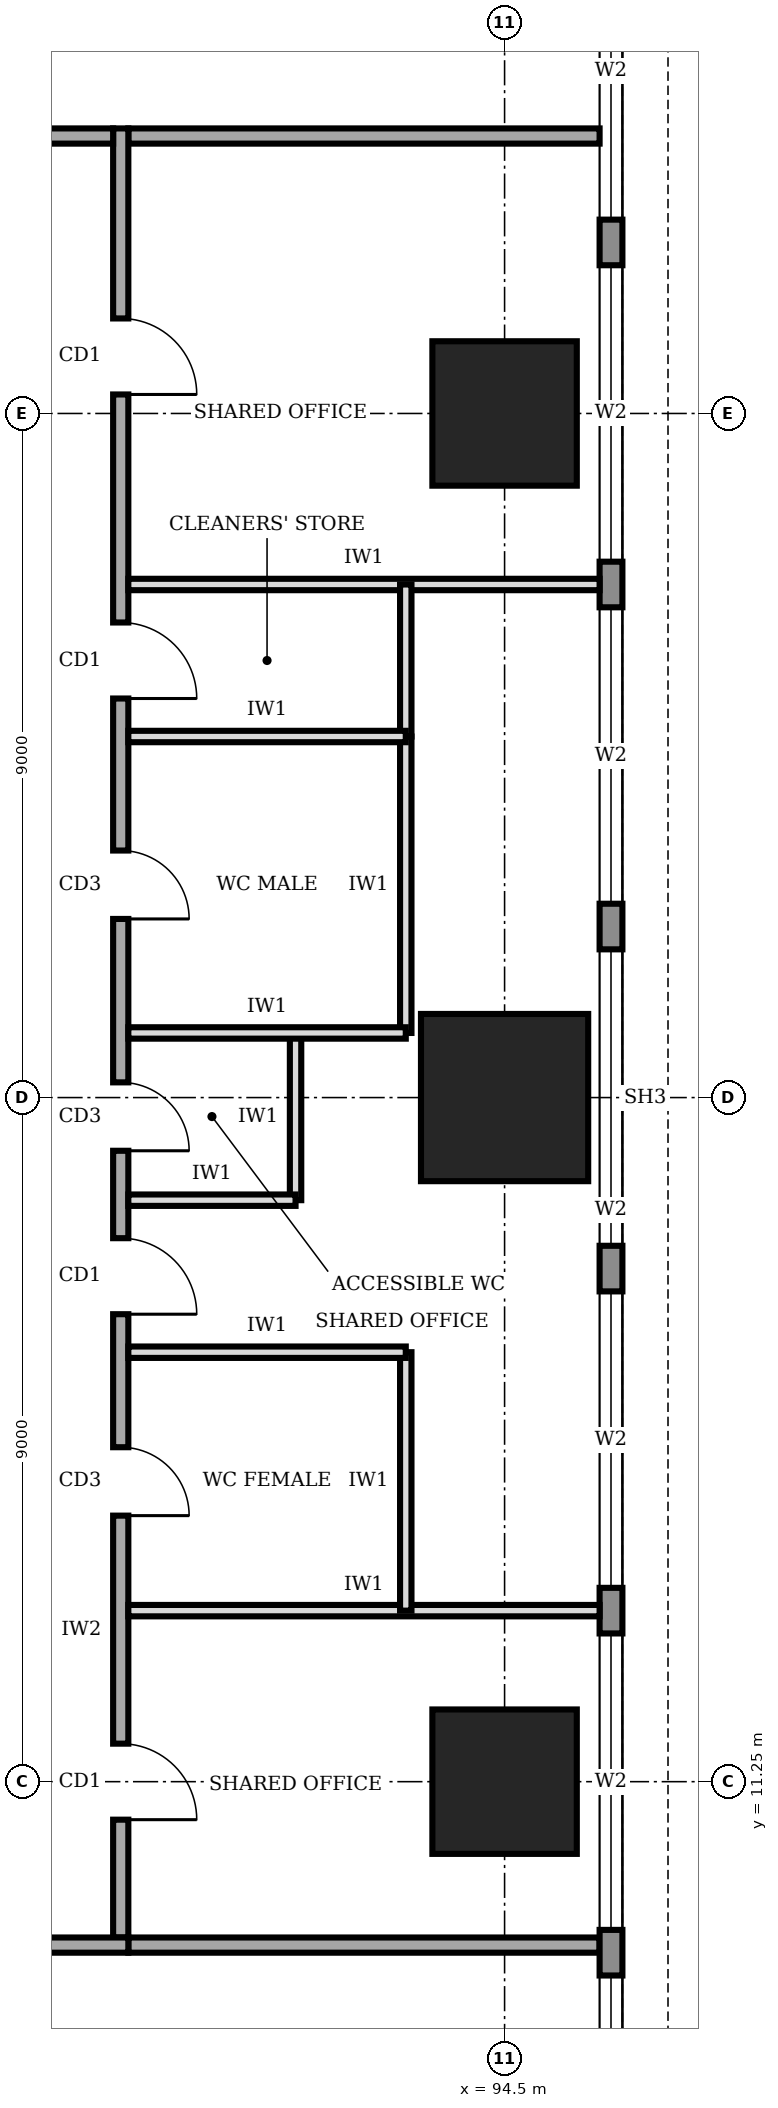
"""IFC4 building model, lengths in metres.
Left out: names, types, materials, properties, quantities, classifications, styles, units other than length and angle.
Written with IfcOpenShell. Run it as: python <this file> out.ifc"""

import sys

from ifc_helpers import new_model, si_unit, direction, frame, frame_2d, origin, origin_2d, place, context, subcontext, project, spatial, rectangle, extrude, element, fill, save


model = new_model("IFC4")
c1 = context("Model", 3, precision=1e-05, world=origin(), true_north=direction((0.0, 1.0)))
c2 = subcontext(c1, "Body", "Model", "MODEL_VIEW")
j1 = project(units=[si_unit("LENGTHUNIT", "METRE"), si_unit("PLANEANGLEUNIT", "RADIAN")], contexts=[c1])
p1 = place(None, origin())
s1 = spatial("IfcSite", under=j1, at=p1, CompositionType="ELEMENT")
p2 = place(p1, origin())
s2 = spatial("IfcBuilding", under=s1, at=p2, CompositionType="ELEMENT")
p3 = place(p2, frame((0.0, 0.0, 145.0)))
s3 = spatial("IfcBuildingStorey", under=s2, at=p3, CompositionType="ELEMENT", Elevation=145.0)
p4 = place(p3, frame((94.5, 11.25, 0.0), z_axis=(0.0, 0.0, 1.0), x_axis=(1.0, 0.0, 0.0)))
e1 = element("IfcColumn", 1, at=p4, inside=s3, PredefinedType="COLUMN", context=c2, shape_type="SweptSolid", body=[
    extrude(rectangle(XDim=1.9, YDim=1.9, at=origin_2d()), origin(), (0.0, 0.0, 1.0), 4.0),
])
p5 = place(p3, frame((94.5, 20.25, 0.0), z_axis=(0.0, 0.0, 1.0), x_axis=(1.0, 0.0, 0.0)))
e2 = element("IfcColumn", 2, at=p5, inside=s3, PredefinedType="COLUMN", context=c2, shape_type="SweptSolid", body=[
    extrude(rectangle(XDim=2.2, YDim=2.2, at=origin_2d()), origin(), (0.0, 0.0, 1.0), 4.0),
])
p6 = place(p3, frame((94.5, 29.25, 0.0), z_axis=(0.0, 0.0, 1.0), x_axis=(1.0, 0.0, 0.0)))
e3 = element("IfcColumn", 3, at=p6, inside=s3, PredefinedType="COLUMN", context=c2, shape_type="SweptSolid", body=[
    extrude(rectangle(XDim=1.9, YDim=1.9, at=origin_2d()), origin(), (0.0, 0.0, 1.0), 4.0),
])
p7 = place(p3, frame((95.9, 3.32, 0.0), z_axis=(0.0, 0.0, 1.0), x_axis=(0.0, 1.0, 0.0)))
e4 = element("IfcWall", 4, at=p7, inside=s3, PredefinedType="STANDARD", context=c2, shape_type="SweptSolid", body=[
    extrude(rectangle(XDim=33.86, YDim=0.3, at=frame_2d((16.93, 0.0))), origin(), (0.0, 0.0, 1.0), 3.75),
])
p8 = place(p7, frame((1.48, 0.0, 0.6)))
e5 = element("IfcOpeningElement", 5, at=p8, cuts=e4, PredefinedType="OPENING", context=c2, shape_type="SweptSolid", body=[
    extrude(rectangle(XDim=3.9, YDim=2.6, at=frame_2d((1.95, 1.3))), frame((0.0, 0.16, 0.0), z_axis=(0.0, -1.0, 0.0), x_axis=(1.0, 0.0, 0.0)), (0.0, 0.0, 1.0), 0.32),
])
p9 = place(p7, frame((5.98, 0.0, 0.6)))
e6 = element("IfcOpeningElement", 6, at=p9, cuts=e4, PredefinedType="OPENING", context=c2, shape_type="SweptSolid", body=[
    extrude(rectangle(XDim=3.9, YDim=2.6, at=frame_2d((1.95, 1.3))), frame((0.0, 0.16, 0.0), z_axis=(0.0, -1.0, 0.0), x_axis=(1.0, 0.0, 0.0)), (0.0, 0.0, 1.0), 0.32),
])
p10 = place(p7, frame((10.48, 0.0, 0.6)))
e7 = element("IfcOpeningElement", 7, at=p10, cuts=e4, PredefinedType="OPENING", context=c2, shape_type="SweptSolid", body=[
    extrude(rectangle(XDim=3.9, YDim=2.6, at=frame_2d((1.95, 1.3))), frame((0.0, 0.16, 0.0), z_axis=(0.0, -1.0, 0.0), x_axis=(1.0, 0.0, 0.0)), (0.0, 0.0, 1.0), 0.32),
])
p11 = place(p7, frame((14.98, 0.0, 0.6)))
e8 = element("IfcOpeningElement", 8, at=p11, cuts=e4, PredefinedType="OPENING", context=c2, shape_type="SweptSolid", body=[
    extrude(rectangle(XDim=3.9, YDim=2.6, at=frame_2d((1.95, 1.3))), frame((0.0, 0.16, 0.0), z_axis=(0.0, -1.0, 0.0), x_axis=(1.0, 0.0, 0.0)), (0.0, 0.0, 1.0), 0.32),
])
p12 = place(p7, frame((19.48, 0.0, 0.6)))
e9 = element("IfcOpeningElement", 9, at=p12, cuts=e4, PredefinedType="OPENING", context=c2, shape_type="SweptSolid", body=[
    extrude(rectangle(XDim=3.9, YDim=2.6, at=frame_2d((1.95, 1.3))), frame((0.0, 0.16, 0.0), z_axis=(0.0, -1.0, 0.0), x_axis=(1.0, 0.0, 0.0)), (0.0, 0.0, 1.0), 0.32),
])
p13 = place(p7, frame((23.98, 0.0, 0.6)))
e10 = element("IfcOpeningElement", 10, at=p13, cuts=e4, PredefinedType="OPENING", context=c2, shape_type="SweptSolid", body=[
    extrude(rectangle(XDim=3.9, YDim=2.6, at=frame_2d((1.95, 1.3))), frame((0.0, 0.16, 0.0), z_axis=(0.0, -1.0, 0.0), x_axis=(1.0, 0.0, 0.0)), (0.0, 0.0, 1.0), 0.32),
])
p14 = place(p7, frame((28.48, 0.0, 0.6)))
e11 = element("IfcOpeningElement", 11, at=p14, cuts=e4, PredefinedType="OPENING", context=c2, shape_type="SweptSolid", body=[
    extrude(rectangle(XDim=3.9, YDim=2.6, at=frame_2d((1.95, 1.3))), frame((0.0, 0.16, 0.0), z_axis=(0.0, -1.0, 0.0), x_axis=(1.0, 0.0, 0.0)), (0.0, 0.0, 1.0), 0.32),
])
p15 = place(p3, frame((63.3, 9.1, 0.0), z_axis=(0.0, 0.0, 1.0), x_axis=(1.0, 0.0, 0.0)))
e12 = element("IfcWall", 12, at=p15, inside=s3, PredefinedType="SOLIDWALL", context=c2, shape_type="SweptSolid", body=[
    extrude(rectangle(XDim=26.25, YDim=0.2, at=frame_2d((13.125, 0.0))), origin(), (0.0, 0.0, 1.0), 3.75),
])
p16 = place(p15, frame((6.0, 0.0, 0.0)))
e13 = element("IfcOpeningElement", 13, at=p16, cuts=e12, PredefinedType="OPENING", context=c2, shape_type="SweptSolid", body=[
    extrude(rectangle(XDim=1.0, YDim=2.1, at=frame_2d((0.5, 1.05))), frame((0.0, 0.11, 0.0), z_axis=(0.0, -1.0, 0.0), x_axis=(1.0, 0.0, 0.0)), (0.0, 0.0, 1.0), 0.22),
])
p17 = place(p15, frame((17.2, 0.0, 0.0)))
e14 = element("IfcOpeningElement", 14, at=p17, cuts=e12, PredefinedType="OPENING", context=c2, shape_type="SweptSolid", body=[
    extrude(rectangle(XDim=1.0, YDim=2.1, at=frame_2d((0.5, 1.05))), frame((0.0, 0.11, 0.0), z_axis=(0.0, -1.0, 0.0), x_axis=(1.0, 0.0, 0.0)), (0.0, 0.0, 1.0), 0.22),
])
p18 = place(p15, frame((23.825, 0.0, 0.0)))
e15 = element("IfcOpeningElement", 15, at=p18, cuts=e12, PredefinedType="OPENING", context=c2, shape_type="SweptSolid", body=[
    extrude(rectangle(XDim=1.0, YDim=2.1, at=frame_2d((0.5, 1.05))), frame((0.0, 0.11, 0.0), z_axis=(0.0, -1.0, 0.0), x_axis=(1.0, 0.0, 0.0)), (0.0, 0.0, 1.0), 0.22),
])
p19 = place(p3, frame((89.45, 9.2, 0.0), z_axis=(0.0, 0.0, 1.0), x_axis=(0.0, 1.0, 0.0)))
e16 = element("IfcWall", 16, at=p19, inside=s3, PredefinedType="SOLIDWALL", context=c2, shape_type="SweptSolid", body=[
    extrude(rectangle(XDim=23.8, YDim=0.2, at=frame_2d((11.9, 0.0))), origin(), (0.0, 0.0, 1.0), 3.75),
])
p20 = place(p19, frame((1.55, 0.0, 0.0)))
e17 = element("IfcOpeningElement", 17, at=p20, cuts=e16, PredefinedType="OPENING", context=c2, shape_type="SweptSolid", body=[
    extrude(rectangle(XDim=1.0, YDim=2.1, at=frame_2d((0.5, 1.05))), frame((0.0, 0.11, 0.0), z_axis=(0.0, -1.0, 0.0), x_axis=(1.0, 0.0, 0.0)), (0.0, 0.0, 1.0), 0.22),
])
p21 = place(p19, frame((5.55, 0.0, 0.0)))
e18 = element("IfcOpeningElement", 18, at=p21, cuts=e16, PredefinedType="OPENING", context=c2, shape_type="SweptSolid", body=[
    extrude(rectangle(XDim=0.9, YDim=2.1, at=frame_2d((0.45, 1.05))), frame((0.0, 0.11, 0.0), z_axis=(0.0, -1.0, 0.0), x_axis=(1.0, 0.0, 0.0)), (0.0, 0.0, 1.0), 0.22),
])
p22 = place(p19, frame((10.35, 0.0, 0.0)))
e19 = element("IfcOpeningElement", 19, at=p22, cuts=e16, PredefinedType="OPENING", context=c2, shape_type="SweptSolid", body=[
    extrude(rectangle(XDim=0.9, YDim=2.1, at=frame_2d((0.45, 1.05))), frame((0.0, 0.11, 0.0), z_axis=(0.0, -1.0, 0.0), x_axis=(1.0, 0.0, 0.0)), (0.0, 0.0, 1.0), 0.22),
])
p23 = place(p19, frame((13.4, 0.0, 0.0)))
e20 = element("IfcOpeningElement", 20, at=p23, cuts=e16, PredefinedType="OPENING", context=c2, shape_type="SweptSolid", body=[
    extrude(rectangle(XDim=0.9, YDim=2.1, at=frame_2d((0.45, 1.05))), frame((0.0, 0.11, 0.0), z_axis=(0.0, -1.0, 0.0), x_axis=(1.0, 0.0, 0.0)), (0.0, 0.0, 1.0), 0.22),
])
p24 = place(p19, frame((16.3, 0.0, 0.0)))
e21 = element("IfcOpeningElement", 21, at=p24, cuts=e16, PredefinedType="OPENING", context=c2, shape_type="SweptSolid", body=[
    extrude(rectangle(XDim=1.0, YDim=2.1, at=frame_2d((0.5, 1.05))), frame((0.0, 0.11, 0.0), z_axis=(0.0, -1.0, 0.0), x_axis=(1.0, 0.0, 0.0)), (0.0, 0.0, 1.0), 0.22),
])
p25 = place(p19, frame((8.2, 0.0, 0.0)))
e22 = element("IfcOpeningElement", 22, at=p25, cuts=e16, PredefinedType="OPENING", context=c2, shape_type="SweptSolid", body=[
    extrude(rectangle(XDim=1.0, YDim=2.1, at=frame_2d((0.5, 1.05))), frame((0.0, 0.11, 0.0), z_axis=(0.0, -1.0, 0.0), x_axis=(1.0, 0.0, 0.0)), (0.0, 0.0, 1.0), 0.22),
])
p26 = place(p19, frame((20.3, 0.0, 0.0)))
e23 = element("IfcOpeningElement", 23, at=p26, cuts=e16, PredefinedType="OPENING", context=c2, shape_type="SweptSolid", body=[
    extrude(rectangle(XDim=1.0, YDim=2.1, at=frame_2d((0.5, 1.05))), frame((0.0, 0.11, 0.0), z_axis=(0.0, -1.0, 0.0), x_axis=(1.0, 0.0, 0.0)), (0.0, 0.0, 1.0), 0.22),
])
p27 = place(p3, frame((89.35, 32.9, 0.0), z_axis=(0.0, 0.0, 1.0), x_axis=(-1.0, 0.0, 0.0)))
e24 = element("IfcWall", 24, at=p27, inside=s3, PredefinedType="SOLIDWALL", context=c2, shape_type="SweptSolid", body=[
    extrude(rectangle(XDim=26.05, YDim=0.2, at=frame_2d((13.025, 0.0))), origin(), (0.0, 0.0, 1.0), 3.75),
])
p28 = place(p27, frame((19.05, 0.0, 0.0)))
e25 = element("IfcOpeningElement", 25, at=p28, cuts=e24, PredefinedType="OPENING", context=c2, shape_type="SweptSolid", body=[
    extrude(rectangle(XDim=1.0, YDim=2.1, at=frame_2d((0.5, 1.05))), frame((0.0, 0.11, 0.0), z_axis=(0.0, -1.0, 0.0), x_axis=(1.0, 0.0, 0.0)), (0.0, 0.0, 1.0), 0.22),
])
p29 = place(p27, frame((5.425, 0.0, 0.0)))
e26 = element("IfcOpeningElement", 26, at=p29, cuts=e24, PredefinedType="OPENING", context=c2, shape_type="SweptSolid", body=[
    extrude(rectangle(XDim=1.8, YDim=2.1, at=frame_2d((0.9, 1.05))), frame((0.0, 0.11, 0.0), z_axis=(0.0, -1.0, 0.0), x_axis=(1.0, 0.0, 0.0)), (0.0, 0.0, 1.0), 0.22),
])
for number, where, z_axis, x_axis in (
    (27, (89.55, 9.1, 0.0), (0.0, 0.0, 1.0), (1.0, 0.0, 0.0)),
    (28, (89.55, 32.9, 0.0), (0.0, 0.0, 1.0), (1.0, 0.0, 0.0)),
):
    element("IfcWall", number, at=place(p3, frame(where, z_axis=z_axis, x_axis=x_axis)), inside=s3, PredefinedType="SOLIDWALL", context=c2, shape_type="SweptSolid", body=[
        extrude(rectangle(XDim=6.2, YDim=0.2, at=frame_2d((3.1, 0.0))), origin(), (0.0, 0.0, 1.0), 3.75),
    ])
for number, where, z_axis, x_axis in (
    (29, (89.55, 13.5, 0.0), (0.0, 0.0, 1.0), (1.0, 0.0, 0.0)),
    (30, (89.55, 27.0, 0.0), (0.0, 0.0, 1.0), (1.0, 0.0, 0.0)),
):
    element("IfcWall", number, at=place(p3, frame(where, z_axis=z_axis, x_axis=x_axis)), inside=s3, PredefinedType="PARTITIONING", context=c2, shape_type="SweptSolid", body=[
        extrude(rectangle(XDim=6.2, YDim=0.15, at=frame_2d((3.1, 0.0))), origin(), (0.0, 0.0, 1.0), 3.75),
    ])
p30 = place(p3, frame((89.55, 16.9, 0.0), z_axis=(0.0, 0.0, 1.0), x_axis=(1.0, 0.0, 0.0)))
e31 = element("IfcWall", 31, at=p30, inside=s3, PredefinedType="PARTITIONING", context=c2, shape_type="SweptSolid", body=[
    extrude(rectangle(XDim=3.65, YDim=0.15, at=frame_2d((1.825, 0.0))), origin(), (0.0, 0.0, 1.0), 3.75),
])
p31 = place(p3, frame((89.55, 18.9, 0.0), z_axis=(0.0, 0.0, 1.0), x_axis=(1.0, 0.0, 0.0)))
e32 = element("IfcWall", 32, at=p31, inside=s3, PredefinedType="PARTITIONING", context=c2, shape_type="SweptSolid", body=[
    extrude(rectangle(XDim=2.2, YDim=0.15, at=frame_2d((1.1, 0.0))), origin(), (0.0, 0.0, 1.0), 3.75),
])
p32 = place(p3, frame((89.55, 21.1, 0.0), z_axis=(0.0, 0.0, 1.0), x_axis=(1.0, 0.0, 0.0)))
e33 = element("IfcWall", 33, at=p32, inside=s3, PredefinedType="PARTITIONING", context=c2, shape_type="SweptSolid", body=[
    extrude(rectangle(XDim=3.65, YDim=0.15, at=frame_2d((1.825, 0.0))), origin(), (0.0, 0.0, 1.0), 2.85),
])
p33 = place(p3, frame((89.55, 25.0, 0.0), z_axis=(0.0, 0.0, 1.0), x_axis=(1.0, 0.0, 0.0)))
e34 = element("IfcWall", 34, at=p33, inside=s3, PredefinedType="PARTITIONING", context=c2, shape_type="SweptSolid", body=[
    extrude(rectangle(XDim=3.65, YDim=0.15, at=frame_2d((1.825, 0.0))), origin(), (0.0, 0.0, 1.0), 3.75),
])
p34 = place(p3, frame((93.2, 13.5, 0.0), z_axis=(0.0, 0.0, 1.0), x_axis=(0.0, 1.0, 0.0)))
e35 = element("IfcWall", 35, at=p34, inside=s3, PredefinedType="PARTITIONING", context=c2, shape_type="SweptSolid", body=[
    extrude(rectangle(XDim=3.4, YDim=0.15, at=frame_2d((1.7, 0.0))), origin(), (0.0, 0.0, 1.0), 3.75),
])
p35 = place(p3, frame((91.75, 18.9, 0.0), z_axis=(0.0, 0.0, 1.0), x_axis=(0.0, 1.0, 0.0)))
e36 = element("IfcWall", 36, at=p35, inside=s3, PredefinedType="PARTITIONING", context=c2, shape_type="SweptSolid", body=[
    extrude(rectangle(XDim=2.2, YDim=0.15, at=frame_2d((1.1, 0.0))), origin(), (0.0, 0.0, 1.0), 3.75),
])
p36 = place(p3, frame((93.2, 21.1, 0.0), z_axis=(0.0, 0.0, 1.0), x_axis=(0.0, 1.0, 0.0)))
e37 = element("IfcWall", 37, at=p36, inside=s3, PredefinedType="PARTITIONING", context=c2, shape_type="SweptSolid", body=[
    extrude(rectangle(XDim=3.9, YDim=0.15, at=frame_2d((1.95, 0.0))), origin(), (0.0, 0.0, 1.0), 3.75),
])
p37 = place(p3, frame((93.2, 25.0, 0.0), z_axis=(0.0, 0.0, 1.0), x_axis=(0.0, 1.0, 0.0)))
e38 = element("IfcWall", 38, at=p37, inside=s3, PredefinedType="PARTITIONING", context=c2, shape_type="SweptSolid", body=[
    extrude(rectangle(XDim=2.0, YDim=0.15, at=frame_2d((1.0, 0.0))), origin(), (0.0, 0.0, 1.0), 3.75),
])
p38 = place(p8, origin())
e39 = element("IfcWindow", 39, at=p38, inside=s3, PartitioningType="SINGLE_PANEL", PredefinedType="WINDOW", context=c2, shape_type="SweptSolid", body=[
    extrude(rectangle(XDim=3.9, YDim=2.6, at=frame_2d((1.95, 1.3))), frame((0.0, 0.03, 0.0), z_axis=(0.0, -1.0, 0.0), x_axis=(1.0, 0.0, 0.0)), (0.0, 0.0, 1.0), 0.06),
])
fill(e5, e39)
p39 = place(p9, origin())
e40 = element("IfcWindow", 40, at=p39, inside=s3, PartitioningType="SINGLE_PANEL", PredefinedType="WINDOW", context=c2, shape_type="SweptSolid", body=[
    extrude(rectangle(XDim=3.9, YDim=2.6, at=frame_2d((1.95, 1.3))), frame((0.0, 0.03, 0.0), z_axis=(0.0, -1.0, 0.0), x_axis=(1.0, 0.0, 0.0)), (0.0, 0.0, 1.0), 0.06),
])
fill(e6, e40)
p40 = place(p10, origin())
e41 = element("IfcWindow", 41, at=p40, inside=s3, PartitioningType="SINGLE_PANEL", PredefinedType="WINDOW", context=c2, shape_type="SweptSolid", body=[
    extrude(rectangle(XDim=3.9, YDim=2.6, at=frame_2d((1.95, 1.3))), frame((0.0, 0.03, 0.0), z_axis=(0.0, -1.0, 0.0), x_axis=(1.0, 0.0, 0.0)), (0.0, 0.0, 1.0), 0.06),
])
fill(e7, e41)
p41 = place(p11, origin())
e42 = element("IfcWindow", 42, at=p41, inside=s3, PartitioningType="SINGLE_PANEL", PredefinedType="WINDOW", context=c2, shape_type="SweptSolid", body=[
    extrude(rectangle(XDim=3.9, YDim=2.6, at=frame_2d((1.95, 1.3))), frame((0.0, 0.03, 0.0), z_axis=(0.0, -1.0, 0.0), x_axis=(1.0, 0.0, 0.0)), (0.0, 0.0, 1.0), 0.06),
])
fill(e8, e42)
p42 = place(p12, origin())
e43 = element("IfcWindow", 43, at=p42, inside=s3, PartitioningType="SINGLE_PANEL", PredefinedType="WINDOW", context=c2, shape_type="SweptSolid", body=[
    extrude(rectangle(XDim=3.9, YDim=2.6, at=frame_2d((1.95, 1.3))), frame((0.0, 0.03, 0.0), z_axis=(0.0, -1.0, 0.0), x_axis=(1.0, 0.0, 0.0)), (0.0, 0.0, 1.0), 0.06),
])
fill(e9, e43)
p43 = place(p13, origin())
e44 = element("IfcWindow", 44, at=p43, inside=s3, PartitioningType="SINGLE_PANEL", PredefinedType="WINDOW", context=c2, shape_type="SweptSolid", body=[
    extrude(rectangle(XDim=3.9, YDim=2.6, at=frame_2d((1.95, 1.3))), frame((0.0, 0.03, 0.0), z_axis=(0.0, -1.0, 0.0), x_axis=(1.0, 0.0, 0.0)), (0.0, 0.0, 1.0), 0.06),
])
fill(e10, e44)
p44 = place(p14, origin())
e45 = element("IfcWindow", 45, at=p44, inside=s3, PartitioningType="SINGLE_PANEL", PredefinedType="WINDOW", context=c2, shape_type="SweptSolid", body=[
    extrude(rectangle(XDim=3.9, YDim=2.6, at=frame_2d((1.95, 1.3))), frame((0.0, 0.03, 0.0), z_axis=(0.0, -1.0, 0.0), x_axis=(1.0, 0.0, 0.0)), (0.0, 0.0, 1.0), 0.06),
])
fill(e11, e45)
p45 = place(p20, frame((1.0, 0.0, 0.0), z_axis=(0.0, 0.0, 1.0), x_axis=(-1.0, 0.0, 0.0)))
e46 = element("IfcDoor", 46, at=p45, inside=s3, OperationType="SINGLE_SWING_RIGHT", PredefinedType="DOOR", context=c2, shape_type="SweptSolid", body=[
    extrude(rectangle(XDim=1.0, YDim=2.1, at=frame_2d((0.5, 1.05))), frame((0.0, 0.025, 0.0), z_axis=(0.0, -1.0, 0.0), x_axis=(1.0, 0.0, 0.0)), (0.0, 0.0, 1.0), 0.05),
])
fill(e17, e46)
p46 = place(p21, frame((0.9, 0.0, 0.0), z_axis=(0.0, 0.0, 1.0), x_axis=(-1.0, 0.0, 0.0)))
e47 = element("IfcDoor", 47, at=p46, inside=s3, OperationType="SINGLE_SWING_RIGHT", PredefinedType="DOOR", context=c2, shape_type="SweptSolid", body=[
    extrude(rectangle(XDim=0.9, YDim=2.1, at=frame_2d((0.45, 1.05))), frame((0.0, 0.025, 0.0), z_axis=(0.0, -1.0, 0.0), x_axis=(1.0, 0.0, 0.0)), (0.0, 0.0, 1.0), 0.05),
])
fill(e18, e47)
p47 = place(p22, frame((0.9, 0.0, 0.0), z_axis=(0.0, 0.0, 1.0), x_axis=(-1.0, 0.0, 0.0)))
e48 = element("IfcDoor", 48, at=p47, inside=s3, OperationType="SINGLE_SWING_RIGHT", PredefinedType="DOOR", context=c2, shape_type="SweptSolid", body=[
    extrude(rectangle(XDim=0.9, YDim=2.1, at=frame_2d((0.45, 1.05))), frame((0.0, 0.025, 0.0), z_axis=(0.0, -1.0, 0.0), x_axis=(1.0, 0.0, 0.0)), (0.0, 0.0, 1.0), 0.05),
])
fill(e19, e48)
p48 = place(p23, frame((0.9, 0.0, 0.0), z_axis=(0.0, 0.0, 1.0), x_axis=(-1.0, 0.0, 0.0)))
e49 = element("IfcDoor", 49, at=p48, inside=s3, OperationType="SINGLE_SWING_RIGHT", PredefinedType="DOOR", context=c2, shape_type="SweptSolid", body=[
    extrude(rectangle(XDim=0.9, YDim=2.1, at=frame_2d((0.45, 1.05))), frame((0.0, 0.025, 0.0), z_axis=(0.0, -1.0, 0.0), x_axis=(1.0, 0.0, 0.0)), (0.0, 0.0, 1.0), 0.05),
])
fill(e20, e49)
p49 = place(p24, frame((1.0, 0.0, 0.0), z_axis=(0.0, 0.0, 1.0), x_axis=(-1.0, 0.0, 0.0)))
e50 = element("IfcDoor", 50, at=p49, inside=s3, OperationType="SINGLE_SWING_RIGHT", PredefinedType="DOOR", context=c2, shape_type="SweptSolid", body=[
    extrude(rectangle(XDim=1.0, YDim=2.1, at=frame_2d((0.5, 1.05))), frame((0.0, 0.025, 0.0), z_axis=(0.0, -1.0, 0.0), x_axis=(1.0, 0.0, 0.0)), (0.0, 0.0, 1.0), 0.05),
])
fill(e21, e50)
p50 = place(p25, frame((1.0, 0.0, 0.0), z_axis=(0.0, 0.0, 1.0), x_axis=(-1.0, 0.0, 0.0)))
e51 = element("IfcDoor", 51, at=p50, inside=s3, OperationType="SINGLE_SWING_RIGHT", PredefinedType="DOOR", context=c2, shape_type="SweptSolid", body=[
    extrude(rectangle(XDim=1.0, YDim=2.1, at=frame_2d((0.5, 1.05))), frame((0.0, 0.025, 0.0), z_axis=(0.0, -1.0, 0.0), x_axis=(1.0, 0.0, 0.0)), (0.0, 0.0, 1.0), 0.05),
])
fill(e22, e51)
p51 = place(p26, frame((1.0, 0.0, 0.0), z_axis=(0.0, 0.0, 1.0), x_axis=(-1.0, 0.0, 0.0)))
e52 = element("IfcDoor", 52, at=p51, inside=s3, OperationType="SINGLE_SWING_RIGHT", PredefinedType="DOOR", context=c2, shape_type="SweptSolid", body=[
    extrude(rectangle(XDim=1.0, YDim=2.1, at=frame_2d((0.5, 1.05))), frame((0.0, 0.025, 0.0), z_axis=(0.0, -1.0, 0.0), x_axis=(1.0, 0.0, 0.0)), (0.0, 0.0, 1.0), 0.05),
])
fill(e23, e52)
save(model, sys.argv[1])
